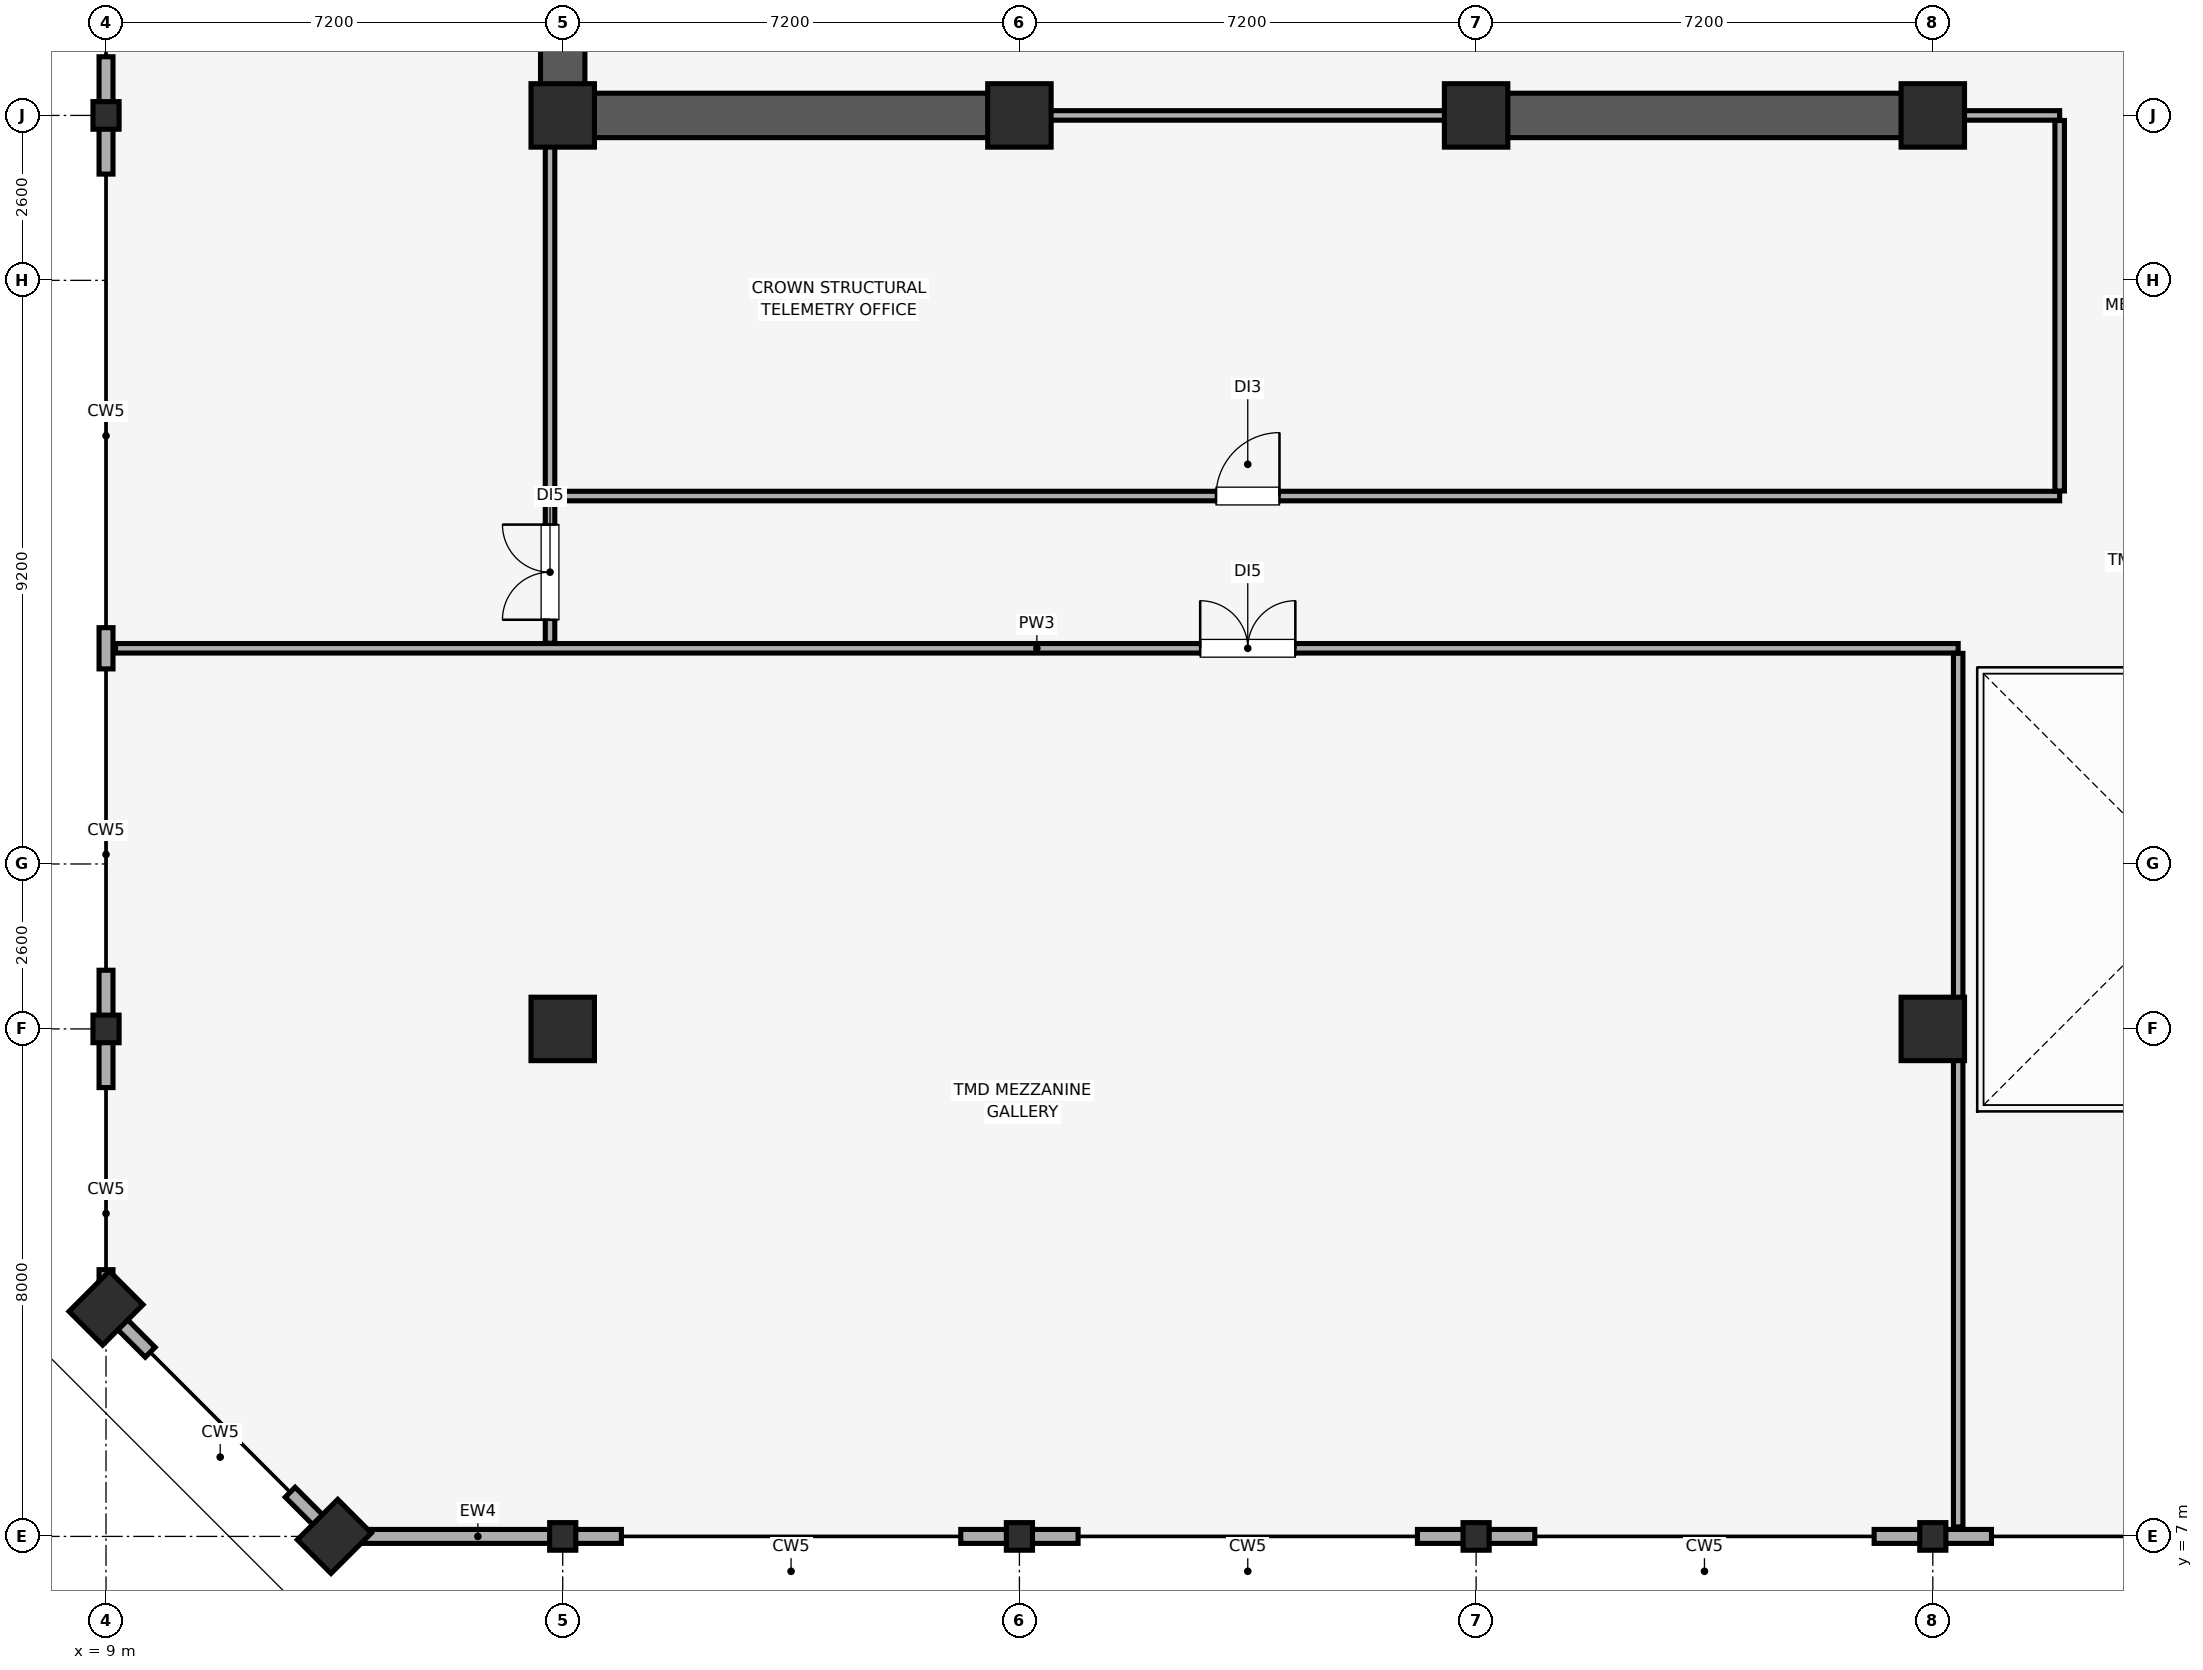
"""IFC4 building model, lengths in metres.
Left out: names, types, materials, properties, quantities, classifications, styles, units other than length and angle.
Written with IfcOpenShell. Run it as: python <this file> out.ifc"""

import sys

from ifc_helpers import new_model, si_unit, direction, frame, frame_2d, origin, origin_2d, place, context, subcontext, project, spatial, rectangle, i_section, extrude, element, fill, save


model = new_model("IFC4")
c1 = context("Model", 3, precision=1e-05, world=origin(), true_north=direction((0.0, 1.0)))
c2 = subcontext(c1, "Body", "Model", "MODEL_VIEW")
j1 = project(units=[si_unit("LENGTHUNIT", "METRE"), si_unit("PLANEANGLEUNIT", "RADIAN")], contexts=[c1])
p1 = place(None, origin())
s1 = spatial("IfcSite", under=j1, at=p1, CompositionType="ELEMENT")
p2 = place(p1, origin())
s2 = spatial("IfcBuilding", under=s1, at=p2, CompositionType="ELEMENT")
p3 = place(p2, frame((0.0, 0.0, 300.2)))
s3 = spatial("IfcBuildingStorey", under=s2, at=p3, CompositionType="ELEMENT", Elevation=300.2)
for number, where, z_axis, x_axis in (
    (1, (16.2, 7.0, 0.0), (0.0, 0.0, 1.0), (1.0, 0.0, 0.0)),
    (2, (23.4, 7.0, 0.0), (0.0, 0.0, 1.0), (1.0, 0.0, 0.0)),
    (3, (30.6, 7.0, 0.0), (0.0, 0.0, 1.0), (1.0, 0.0, 0.0)),
    (4, (37.8, 7.0, 0.0), (0.0, 0.0, 1.0), (1.0, 0.0, 0.0)),
    (5, (9.0, 15.0, 0.0), (0.0, 0.0, 1.0), (1.0, 0.0, 0.0)),
    (6, (9.0, 29.4, 0.0), (0.0, 0.0, 1.0), (1.0, 0.0, 0.0)),
):
    element("IfcColumn", number, at=place(p3, frame(where, z_axis=z_axis, x_axis=x_axis)), inside=s3, PredefinedType="COLUMN", context=c2, shape_type="SweptSolid", body=[
        extrude(i_section(OverallWidth=0.412, OverallDepth=0.435, WebThickness=0.036, FlangeThickness=0.056, FilletRadius=0.015, at=origin_2d()), origin(), (0.0, 0.0, 1.0), 5.12),
    ])
for number, where, z_axis, x_axis in (
    (7, (12.6, 7.0, 0.0), (0.0, 0.0, 1.0), (0.707, 0.707, 0.0)),
    (8, (9.0, 10.6, 0.0), (0.0, 0.0, 1.0), (0.707, 0.707, 0.0)),
):
    element("IfcColumn", number, at=place(p3, frame(where, z_axis=z_axis, x_axis=x_axis)), inside=s3, PredefinedType="PILASTER", context=c2, shape_type="SweptSolid", body=[
        extrude(rectangle(XDim=0.9, YDim=0.75, at=origin_2d()), origin(), (0.0, 0.0, 1.0), 5.12),
    ])
for number, where, z_axis, x_axis in (
    (9, (16.2, 15.0, 0.0), (0.0, 0.0, 1.0), (1.0, 0.0, 0.0)),
    (10, (37.8, 15.0, 0.0), (0.0, 0.0, 1.0), (1.0, 0.0, 0.0)),
    (11, (16.2, 29.4, 0.0), (0.0, 0.0, 1.0), (1.0, 0.0, 0.0)),
    (12, (23.4, 29.4, 0.0), (0.0, 0.0, 1.0), (1.0, 0.0, 0.0)),
    (13, (30.6, 29.4, 0.0), (0.0, 0.0, 1.0), (1.0, 0.0, 0.0)),
    (14, (37.8, 29.4, 0.0), (0.0, 0.0, 1.0), (1.0, 0.0, 0.0)),
):
    element("IfcColumn", number, at=place(p3, frame(where, z_axis=z_axis, x_axis=x_axis)), inside=s3, PredefinedType="COLUMN", context=c2, shape_type="SweptSolid", body=[
        extrude(rectangle(XDim=1.0, YDim=1.0, at=origin_2d()), origin(), (0.0, 0.0, 1.0), 5.12),
    ])
p4 = place(p3, frame((12.6, 7.0, 0.0), z_axis=(0.0, 0.0, 1.0), x_axis=(1.0, 0.0, 0.0)))
e15 = element("IfcWall", 15, at=p4, inside=s3, PredefinedType="SOLIDWALL", context=c2, shape_type="SweptSolid", body=[
    extrude(rectangle(XDim=4.525, YDim=0.22, at=frame_2d((2.262, 0.0))), origin(), (0.0, 0.0, 1.0), 4.32),
])
for number, where, z_axis, x_axis in (
    (16, (22.475, 7.0, 0.0), (0.0, 0.0, 1.0), (1.0, 0.0, 0.0)),
    (17, (29.675, 7.0, 0.0), (0.0, 0.0, 1.0), (1.0, 0.0, 0.0)),
):
    element("IfcWall", number, at=place(p3, frame(where, z_axis=z_axis, x_axis=x_axis)), inside=s3, PredefinedType="SOLIDWALL", context=c2, shape_type="SweptSolid", body=[
        extrude(rectangle(XDim=1.85, YDim=0.22, at=frame_2d((0.925, 0.0))), origin(), (0.0, 0.0, 1.0), 4.32),
    ])
p5 = place(p3, frame((36.875, 7.0, 0.0), z_axis=(0.0, 0.0, 1.0), x_axis=(1.0, 0.0, 0.0)))
e18 = element("IfcWall", 18, at=p5, inside=s3, PredefinedType="SOLIDWALL", context=c2, shape_type="SweptSolid", body=[
    extrude(rectangle(XDim=1.85, YDim=0.22, at=frame_2d((0.925, 0.0))), origin(), (0.0, 0.0, 1.0), 4.32),
])
p6 = place(p3, frame((9.0, 30.325, 0.0), z_axis=(0.0, 0.0, 1.0), x_axis=(0.0, -1.0, 0.0)))
e19 = element("IfcWall", 19, at=p6, inside=s3, PredefinedType="SOLIDWALL", context=c2, shape_type="SweptSolid", body=[
    extrude(rectangle(XDim=1.85, YDim=0.22, at=frame_2d((0.925, 0.0))), origin(), (0.0, 0.0, 1.0), 4.32),
])
p7 = place(p3, frame((9.0, 21.325, 0.0), z_axis=(0.0, 0.0, 1.0), x_axis=(0.0, -1.0, 0.0)))
e20 = element("IfcWall", 20, at=p7, inside=s3, PredefinedType="SOLIDWALL", context=c2, shape_type="SweptSolid", body=[
    extrude(rectangle(XDim=0.65, YDim=0.22, at=frame_2d((0.325, 0.0))), origin(), (0.0, 0.0, 1.0), 4.32),
])
p8 = place(p3, frame((9.0, 15.925, 0.0), z_axis=(0.0, 0.0, 1.0), x_axis=(0.0, -1.0, 0.0)))
e21 = element("IfcWall", 21, at=p8, inside=s3, PredefinedType="SOLIDWALL", context=c2, shape_type="SweptSolid", body=[
    extrude(rectangle(XDim=1.85, YDim=0.22, at=frame_2d((0.925, 0.0))), origin(), (0.0, 0.0, 1.0), 4.32),
])
p9 = place(p3, frame((9.0, 11.205, 0.0), z_axis=(0.0, 0.0, 1.0), x_axis=(0.0, -1.0, 0.0)))
e22 = element("IfcWall", 22, at=p9, inside=s3, PredefinedType="SOLIDWALL", context=c2, shape_type="SweptSolid", body=[
    extrude(rectangle(XDim=0.605, YDim=0.22, at=frame_2d((0.302, 0.0))), origin(), (0.0, 0.0, 1.0), 5.12),
])
for number, where, z_axis, x_axis in (
    (23, (9.0, 10.6, 0.0), (0.0, 0.0, 1.0), (0.707, -0.707, 0.0)),
    (24, (11.904, 7.697, 0.0), (0.0, 0.0, 1.0), (0.707, -0.707, 0.0)),
):
    element("IfcWall", number, at=place(p3, frame(where, z_axis=z_axis, x_axis=x_axis)), inside=s3, PredefinedType="SOLIDWALL", context=c2, shape_type="SweptSolid", body=[
        extrude(rectangle(XDim=0.985, YDim=0.22, at=frame_2d((0.493, 0.0))), origin(), (0.0, 0.0, 1.0), 4.32),
    ])
p10 = place(p3, frame((16.2, 29.4, 0.0), z_axis=(0.0, 0.0, 1.0), x_axis=(0.0, 1.0, 0.0)))
e25 = element("IfcWall", 25, at=p10, inside=s3, PredefinedType="SHEAR", context=c2, shape_type="SweptSolid", body=[
    extrude(rectangle(XDim=19.2, YDim=0.7, at=frame_2d((9.6, 0.0))), origin(), (0.0, 0.0, 1.0), 5.12),
])
p11 = place(p3, frame((16.555, 29.4, 0.0), z_axis=(0.0, 0.0, 1.0), x_axis=(1.0, 0.0, 0.0)))
e26 = element("IfcWall", 26, at=p11, inside=s3, PredefinedType="SHEAR", context=c2, shape_type="SweptSolid", body=[
    extrude(rectangle(XDim=7.045, YDim=0.7, at=frame_2d((3.522, 0.0))), origin(), (0.0, 0.0, 1.0), 5.12),
])
p12 = place(p3, frame((30.4, 29.4, 0.0), z_axis=(0.0, 0.0, 1.0), x_axis=(1.0, 0.0, 0.0)))
e27 = element("IfcWall", 27, at=p12, inside=s3, PredefinedType="SHEAR", context=c2, shape_type="SweptSolid", body=[
    extrude(rectangle(XDim=7.6, YDim=0.7, at=frame_2d((3.8, 0.0))), origin(), (0.0, 0.0, 1.0), 5.12),
])
p13 = place(p3, frame((9.15, 21.0, 0.0), z_axis=(0.0, 0.0, 1.0), x_axis=(1.0, 0.0, 0.0)))
e28 = element("IfcWall", 28, at=p13, inside=s3, PredefinedType="PARTITIONING", context=c2, shape_type="SweptSolid", body=[
    extrude(rectangle(XDim=29.05, YDim=0.15, at=frame_2d((14.525, 0.0))), origin(), (0.0, 0.0, 1.0), 5.12),
])
p14 = place(p13, frame((17.1, 0.0, 0.0)))
e29 = element("IfcOpeningElement", 29, at=p14, cuts=e28, PredefinedType="OPENING", context=c2, shape_type="SweptSolid", body=[
    extrude(rectangle(XDim=1.5, YDim=2.25, at=frame_2d((0.75, 1.125))), frame((0.0, 0.085, 0.0), z_axis=(0.0, -1.0, 0.0), x_axis=(1.0, 0.0, 0.0)), (0.0, 0.0, 1.0), 0.17),
])
p15 = place(p3, frame((38.2, 7.15, 0.0), z_axis=(0.0, 0.0, 1.0), x_axis=(0.0, 1.0, 0.0)))
e30 = element("IfcWall", 30, at=p15, inside=s3, PredefinedType="PARTITIONING", context=c2, shape_type="SweptSolid", body=[
    extrude(rectangle(XDim=13.77, YDim=0.15, at=frame_2d((6.885, 0.0))), origin(), (0.0, 0.0, 1.0), 5.12),
])
p16 = place(p3, frame((16.0, 23.4, 0.0), z_axis=(0.0, 0.0, 1.0), x_axis=(1.0, 0.0, 0.0)))
e31 = element("IfcWall", 31, at=p16, inside=s3, PredefinedType="PARTITIONING", context=c2, shape_type="SweptSolid", body=[
    extrude(rectangle(XDim=23.8, YDim=0.15, at=frame_2d((11.9, 0.0))), origin(), (0.0, 0.0, 1.0), 5.12),
])
p17 = place(p16, frame((10.5, 0.0, 0.0)))
e32 = element("IfcOpeningElement", 32, at=p17, cuts=e31, PredefinedType="OPENING", context=c2, shape_type="SweptSolid", body=[
    extrude(rectangle(XDim=1.0, YDim=2.15, at=frame_2d((0.5, 1.075))), frame((0.0, 0.085, 0.0), z_axis=(0.0, -1.0, 0.0), x_axis=(1.0, 0.0, 0.0)), (0.0, 0.0, 1.0), 0.17),
])
p18 = place(p3, frame((23.61, 29.4, 0.0), z_axis=(0.0, 0.0, 1.0), x_axis=(1.0, 0.0, 0.0)))
e33 = element("IfcWall", 33, at=p18, inside=s3, PredefinedType="PARTITIONING", context=c2, shape_type="SweptSolid", body=[
    extrude(rectangle(XDim=6.78, YDim=0.15, at=frame_2d((3.39, 0.0))), origin(), (0.0, 0.0, 1.0), 4.02),
])
p19 = place(p3, frame((38.01, 29.4, 0.0), z_axis=(0.0, 0.0, 1.0), x_axis=(1.0, 0.0, 0.0)))
e34 = element("IfcWall", 34, at=p19, inside=s3, PredefinedType="PARTITIONING", context=c2, shape_type="SweptSolid", body=[
    extrude(rectangle(XDim=1.79, YDim=0.15, at=frame_2d((0.895, 0.0))), origin(), (0.0, 0.0, 1.0), 4.02),
])
p20 = place(p3, frame((16.0, 23.48, 0.0), z_axis=(0.0, 0.0, 1.0), x_axis=(0.0, 1.0, 0.0)))
e35 = element("IfcWall", 35, at=p20, inside=s3, PredefinedType="PARTITIONING", context=c2, shape_type="SweptSolid", body=[
    extrude(rectangle(XDim=5.91, YDim=0.15, at=frame_2d((2.955, 0.0))), origin(), (0.0, 0.0, 1.0), 4.76),
])
p21 = place(p3, frame((39.8, 23.48, 0.0), z_axis=(0.0, 0.0, 1.0), x_axis=(0.0, 1.0, 0.0)))
e36 = element("IfcWall", 36, at=p21, inside=s3, PredefinedType="PARTITIONING", context=c2, shape_type="SweptSolid", body=[
    extrude(rectangle(XDim=5.84, YDim=0.15, at=frame_2d((2.92, 0.0))), origin(), (0.0, 0.0, 1.0), 5.12),
])
p22 = place(p3, frame((16.0, 21.08, 0.0), z_axis=(0.0, 0.0, 1.0), x_axis=(0.0, 1.0, 0.0)))
e37 = element("IfcWall", 37, at=p22, inside=s3, PredefinedType="PARTITIONING", context=c2, shape_type="SweptSolid", body=[
    extrude(rectangle(XDim=2.24, YDim=0.15, at=frame_2d((1.12, 0.0))), origin(), (0.0, 0.0, 1.0), 4.76),
])
p23 = place(p22, frame((0.37, 0.0, 0.0)))
e38 = element("IfcOpeningElement", 38, at=p23, cuts=e37, PredefinedType="OPENING", context=c2, shape_type="SweptSolid", body=[
    extrude(rectangle(XDim=1.5, YDim=2.25, at=frame_2d((0.75, 1.125))), frame((0.0, 0.085, 0.0), z_axis=(0.0, -1.0, 0.0), x_axis=(1.0, 0.0, 0.0)), (0.0, 0.0, 1.0), 0.17),
])
p24 = place(p14, origin())
e39 = element("IfcDoor", 39, at=p24, inside=s3, OperationType="DOUBLE_DOOR_SINGLE_SWING", PredefinedType="DOOR", context=c2, shape_type="SweptSolid", body=[
    extrude(rectangle(XDim=1.5, YDim=2.25, at=frame_2d((0.75, 1.125))), frame((0.0, 0.025, 0.0), z_axis=(0.0, -1.0, 0.0), x_axis=(1.0, 0.0, 0.0)), (0.0, 0.0, 1.0), 0.05),
])
fill(e29, e39)
p25 = place(p17, origin())
e40 = element("IfcDoor", 40, at=p25, inside=s3, OperationType="SINGLE_SWING_RIGHT", PredefinedType="DOOR", context=c2, shape_type="SweptSolid", body=[
    extrude(rectangle(XDim=1.0, YDim=2.15, at=frame_2d((0.5, 1.075))), frame((0.0, 0.025, 0.0), z_axis=(0.0, -1.0, 0.0), x_axis=(1.0, 0.0, 0.0)), (0.0, 0.0, 1.0), 0.05),
])
fill(e32, e40)
p26 = place(p23, origin())
e41 = element("IfcDoor", 41, at=p26, inside=s3, OperationType="DOUBLE_DOOR_SINGLE_SWING", PredefinedType="DOOR", context=c2, shape_type="SweptSolid", body=[
    extrude(rectangle(XDim=1.5, YDim=2.25, at=frame_2d((0.75, 1.125))), frame((0.0, 0.025, 0.0), z_axis=(0.0, -1.0, 0.0), x_axis=(1.0, 0.0, 0.0)), (0.0, 0.0, 1.0), 0.05),
])
fill(e38, e41)
save(model, sys.argv[1])
